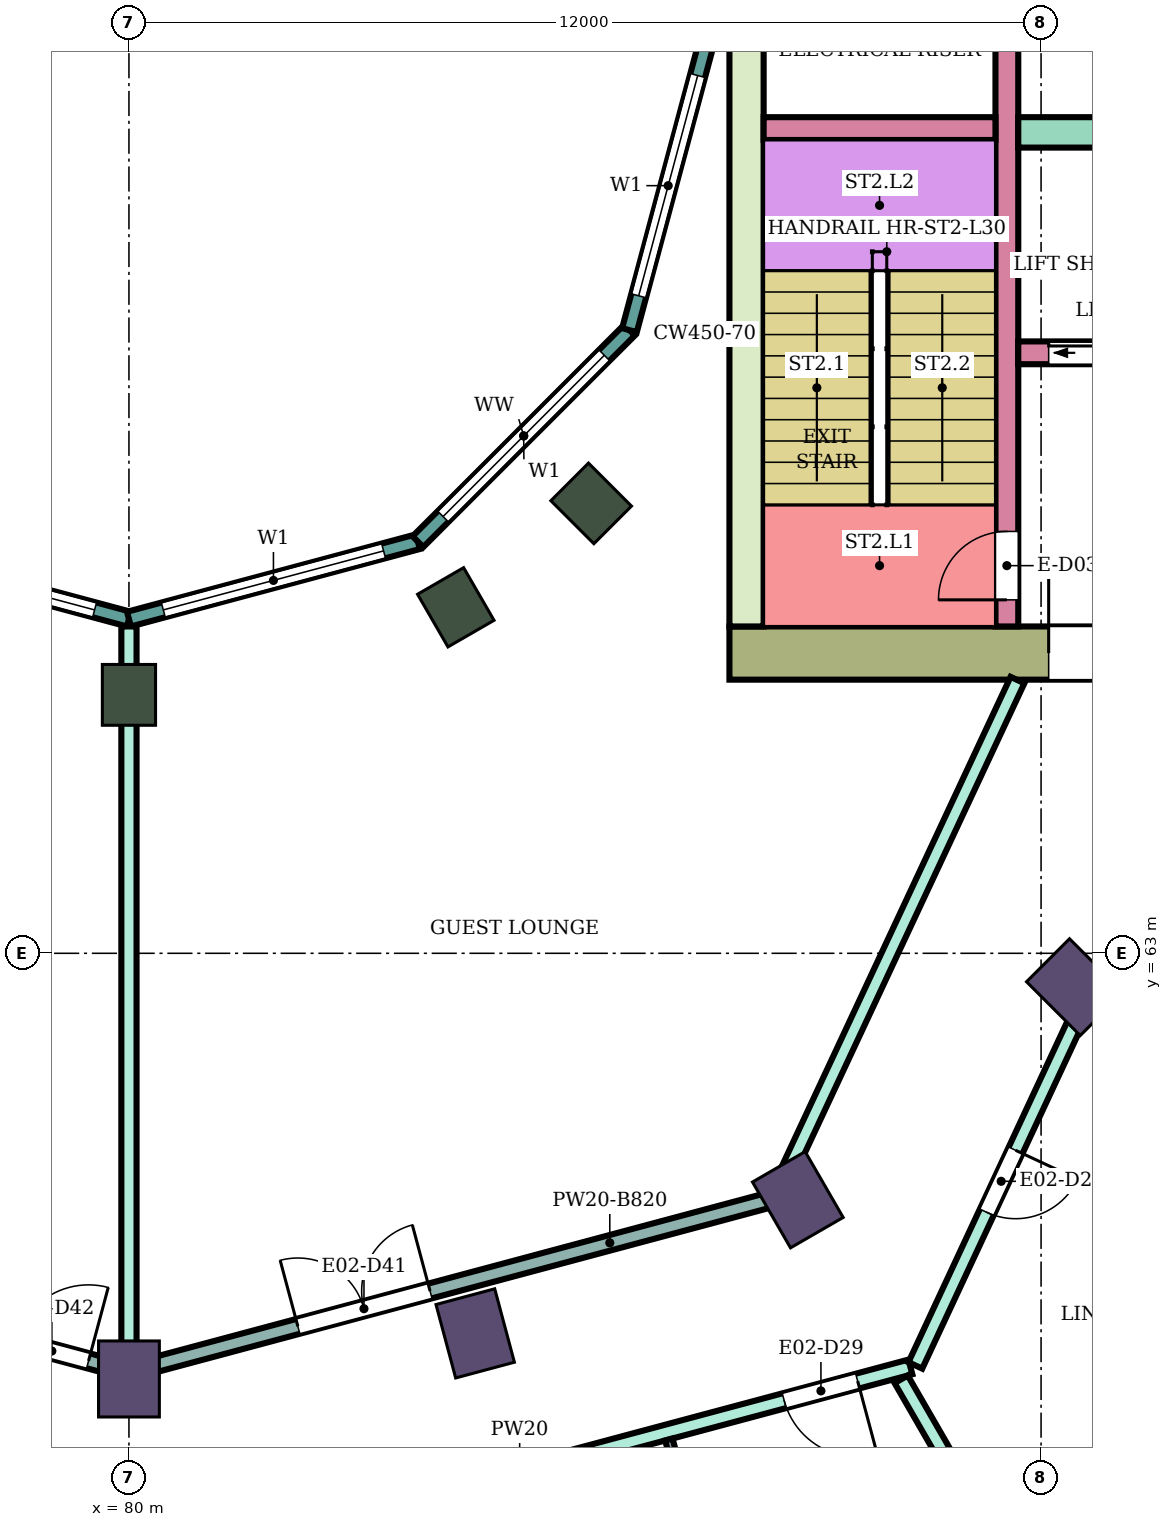
"""IFC4 building model, lengths in metres.
Left out: names, types, materials, properties, quantities, classifications, styles, units other than length and angle.
Written with IfcOpenShell. Run it as: python <this file> out.ifc"""

import sys

from ifc_helpers import new_model, si_unit, direction, frame, frame_2d, origin, origin_2d, place, context, subcontext, project, spatial, rectangle, extrude, element, fill, save


model = new_model("IFC4")
c1 = context("Model", 3, precision=1e-05, world=origin(), true_north=direction((0.0, 1.0)))
c2 = subcontext(c1, "Body", "Model", "MODEL_VIEW")
j1 = project(units=[si_unit("LENGTHUNIT", "METRE"), si_unit("PLANEANGLEUNIT", "RADIAN")], contexts=[c1])
p1 = place(None, origin())
s1 = spatial("IfcSite", under=j1, at=p1, CompositionType="ELEMENT")
p2 = place(p1, origin())
s2 = spatial("IfcBuilding", under=s1, at=p2, CompositionType="ELEMENT")
p3 = place(p2, frame((0.0, 0.0, 130.2)))
s3 = spatial("IfcBuildingStorey", under=s2, at=p3, CompositionType="ELEMENT", Elevation=130.2)
for number, where, z_axis, x_axis in (
    (1, (80.0, 57.4, 0.0), (0.0, 0.0, 1.0), (0.0, -1.0, 0.0)),
    (2, (84.555, 58.0, 0.0), (0.0, 0.0, 1.0), (0.259, -0.966, 0.0)),
    (3, (88.8, 59.758, 0.0), (0.0, 0.0, 1.0), (0.5, -0.866, 0.0)),
    (4, (92.445, 62.555, 0.0), (0.0, 0.0, 1.0), (0.707, -0.707, 0.0)),
):
    element("IfcColumn", number, at=place(p3, frame(where, z_axis=z_axis, x_axis=x_axis)), inside=s3, PredefinedType="COLUMN", context=c2, shape_type="SweptSolid", body=[
        extrude(rectangle(XDim=1.0, YDim=0.8, at=origin_2d()), origin(), (0.0, 0.0, 1.0), 3.9),
    ])
for number, where, z_axis, x_axis in (
    (5, (80.0, 66.4, 0.0), (0.0, 0.0, 1.0), (0.0, -1.0, 0.0)),
    (6, (84.3, 67.552, 0.0), (0.0, 0.0, 1.0), (0.5, -0.866, 0.0)),
    (7, (86.081, 68.919, 0.0), (0.0, 0.0, 1.0), (0.707, -0.707, 0.0)),
):
    element("IfcColumn", number, at=place(p3, frame(where, z_axis=z_axis, x_axis=x_axis)), inside=s3, PredefinedType="COLUMN", context=c2, shape_type="SweptSolid", body=[
        extrude(rectangle(XDim=0.8, YDim=0.7, at=origin_2d()), origin(), (0.0, 0.0, 1.0), 3.9),
    ])
p4 = place(p3, frame((87.9, 66.95, 0.0), z_axis=(0.0, 0.0, 1.0), x_axis=(1.0, 0.0, 0.0)))
e8 = element("IfcWall", 8, at=p4, inside=s3, PredefinedType="SHEAR", context=c2, shape_type="SweptSolid", body=[
    extrude(rectangle(XDim=14.8, YDim=0.7, at=frame_2d((7.4, 0.0))), origin(), (0.0, 0.0, 1.0), 3.58),
])
p5 = place(p4, frame((4.2, 0.0, 0.0)))
e9 = element("IfcOpeningElement", 9, at=p5, cuts=e8, PredefinedType="OPENING", context=c2, shape_type="SweptSolid", body=[
    extrude(rectangle(XDim=2.4, YDim=2.4, at=frame_2d((1.2, 1.2))), frame((0.0, 0.36, 0.0), z_axis=(0.0, -1.0, 0.0), x_axis=(1.0, 0.0, 0.0)), (0.0, 0.0, 1.0), 0.72),
])
p6 = place(p3, frame((88.125, 67.3, 0.0), z_axis=(0.0, 0.0, 1.0), x_axis=(0.0, 1.0, 0.0)))
e10 = element("IfcWall", 10, at=p6, inside=s3, PredefinedType="SHEAR", context=c2, shape_type="SweptSolid", body=[
    extrude(rectangle(XDim=7.7, YDim=0.45, at=frame_2d((3.85, 0.0))), origin(), (0.0, 0.0, 1.0), 3.58),
])
p7 = place(p3, frame((91.55, 67.3, 0.0), z_axis=(0.0, 0.0, 1.0), x_axis=(0.0, 1.0, 0.0)))
e11 = element("IfcWall", 11, at=p7, inside=s3, PredefinedType="SHEAR", context=c2, shape_type="SweptSolid", body=[
    extrude(rectangle(XDim=7.7, YDim=0.3, at=frame_2d((3.85, 0.0))), origin(), (0.0, 0.0, 1.0), 3.58),
])
p8 = place(p7, frame((0.35, 0.0, 0.0)))
e12 = element("IfcOpeningElement", 12, at=p8, cuts=e11, PredefinedType="OPENING", context=c2, shape_type="SweptSolid", body=[
    extrude(rectangle(XDim=0.9, YDim=2.1, at=frame_2d((0.45, 1.05))), frame((0.0, 0.16, 0.0), z_axis=(0.0, -1.0, 0.0), x_axis=(1.0, 0.0, 0.0)), (0.0, 0.0, 1.0), 0.32),
])
p9 = place(p3, frame((88.35, 73.85, 0.0), z_axis=(0.0, 0.0, 1.0), x_axis=(1.0, 0.0, 0.0)))
e13 = element("IfcWall", 13, at=p9, inside=s3, PredefinedType="SHEAR", context=c2, shape_type="SweptSolid", body=[
    extrude(rectangle(XDim=3.05, YDim=0.3, at=frame_2d((1.525, 0.0))), origin(), (0.0, 0.0, 1.0), 3.58),
])
p10 = place(p3, frame((91.7, 73.8, 0.0), z_axis=(0.0, 0.0, 1.0), x_axis=(1.0, 0.0, 0.0)))
e14 = element("IfcWall", 14, at=p10, inside=s3, PredefinedType="SHEAR", context=c2, shape_type="SweptSolid", body=[
    extrude(rectangle(XDim=11.0, YDim=0.4, at=frame_2d((5.5, 0.0))), origin(), (0.0, 0.0, 1.0), 3.58),
])
p11 = place(p3, frame((91.7, 70.9, 0.0), z_axis=(0.0, 0.0, 1.0), x_axis=(1.0, 0.0, 0.0)))
e15 = element("IfcWall", 15, at=p11, inside=s3, PredefinedType="SHEAR", context=c2, shape_type="SweptSolid", body=[
    extrude(rectangle(XDim=11.0, YDim=0.3, at=frame_2d((5.5, 0.0))), origin(), (0.0, 0.0, 1.0), 3.58),
])
p12 = place(p11, frame((0.4, 0.0, 0.0)))
e16 = element("IfcOpeningElement", 16, at=p12, cuts=e15, PredefinedType="OPENING", context=c2, shape_type="SweptSolid", body=[
    extrude(rectangle(XDim=1.4, YDim=2.1, at=frame_2d((0.7, 1.05))), frame((0.0, 0.16, 0.0), z_axis=(0.0, -1.0, 0.0), x_axis=(1.0, 0.0, 0.0)), (0.0, 0.0, 1.0), 0.32),
])
p13 = place(p11, frame((5.4, 0.0, 0.0)))
e17 = element("IfcOpeningElement", 17, at=p13, cuts=e15, PredefinedType="OPENING", context=c2, shape_type="SweptSolid", body=[
    extrude(rectangle(XDim=1.4, YDim=2.1, at=frame_2d((0.7, 1.05))), frame((0.0, 0.16, 0.0), z_axis=(0.0, -1.0, 0.0), x_axis=(1.0, 0.0, 0.0)), (0.0, 0.0, 1.0), 0.32),
])
p14 = place(p11, frame((8.1, 0.0, 0.0)))
e18 = element("IfcOpeningElement", 18, at=p14, cuts=e15, PredefinedType="OPENING", context=c2, shape_type="SweptSolid", body=[
    extrude(rectangle(XDim=1.0, YDim=2.1, at=frame_2d((0.5, 1.05))), frame((0.0, 0.16, 0.0), z_axis=(0.0, -1.0, 0.0), x_axis=(1.0, 0.0, 0.0)), (0.0, 0.0, 1.0), 0.32),
])
p15 = place(p3, frame((76.198, 68.415, 0.0), z_axis=(0.0, 0.0, 1.0), x_axis=(0.965933654434, -0.258789828301, 0.0)))
e19 = element("IfcWall", 19, at=p15, inside=s3, PredefinedType="NOTDEFINED", context=c2, shape_type="SweptSolid", body=[
    extrude(rectangle(XDim=3.936, YDim=0.2, at=frame_2d((1.968, 0.0))), origin(), (0.0, 0.0, 1.0), 3.9),
])
p16 = place(p15, frame((0.468, 0.0, 0.9)))
e20 = element("IfcOpeningElement", 20, at=p16, cuts=e19, PredefinedType="OPENING", context=c2, shape_type="SweptSolid", body=[
    extrude(rectangle(XDim=3.0, YDim=2.3, at=frame_2d((1.5, 1.15))), frame((0.0, 0.11, 0.0), z_axis=(0.0, -1.0, 0.0), x_axis=(1.0, 0.0, 0.0)), (0.0, 0.0, 1.0), 0.22),
])
p17 = place(p3, frame((80.0, 67.396, 0.0), z_axis=(0.0, 0.0, 1.0), x_axis=(0.965933654434, 0.258789828301, 0.0)))
e21 = element("IfcWall", 21, at=p17, inside=s3, PredefinedType="NOTDEFINED", context=c2, shape_type="SweptSolid", body=[
    extrude(rectangle(XDim=3.936, YDim=0.2, at=frame_2d((1.968, 0.0))), origin(), (0.0, 0.0, 1.0), 3.9),
])
p18 = place(p17, frame((0.468, 0.0, 0.9)))
e22 = element("IfcOpeningElement", 22, at=p18, cuts=e21, PredefinedType="OPENING", context=c2, shape_type="SweptSolid", body=[
    extrude(rectangle(XDim=3.0, YDim=2.3, at=frame_2d((1.5, 1.15))), frame((0.0, 0.11, 0.0), z_axis=(0.0, -1.0, 0.0), x_axis=(1.0, 0.0, 0.0)), (0.0, 0.0, 1.0), 0.22),
])
p19 = place(p3, frame((83.802, 68.415, 0.0), z_axis=(0.0, 0.0, 1.0), x_axis=(0.707106781187, 0.707106781187, 0.0)))
e23 = element("IfcWall", 23, at=p19, inside=s3, PredefinedType="NOTDEFINED", context=c2, shape_type="SweptSolid", body=[
    extrude(rectangle(XDim=3.936, YDim=0.2, at=frame_2d((1.968, 0.0))), origin(), (0.0, 0.0, 1.0), 3.9),
])
p20 = place(p19, frame((0.468, 0.0, 0.9)))
e24 = element("IfcOpeningElement", 24, at=p20, cuts=e23, PredefinedType="OPENING", context=c2, shape_type="SweptSolid", body=[
    extrude(rectangle(XDim=3.0, YDim=2.3, at=frame_2d((1.5, 1.15))), frame((0.0, 0.11, 0.0), z_axis=(0.0, -1.0, 0.0), x_axis=(1.0, 0.0, 0.0)), (0.0, 0.0, 1.0), 0.22),
])
p21 = place(p3, frame((86.585, 71.198, 0.0), z_axis=(0.0, 0.0, 1.0), x_axis=(0.258789828301, 0.965933654434, 0.0)))
e25 = element("IfcWall", 25, at=p21, inside=s3, PredefinedType="NOTDEFINED", context=c2, shape_type="SweptSolid", body=[
    extrude(rectangle(XDim=3.936, YDim=0.2, at=frame_2d((1.968, 0.0))), origin(), (0.0, 0.0, 1.0), 3.9),
])
p22 = place(p21, frame((0.468, 0.0, 0.9)))
e26 = element("IfcOpeningElement", 26, at=p22, cuts=e25, PredefinedType="OPENING", context=c2, shape_type="SweptSolid", body=[
    extrude(rectangle(XDim=3.0, YDim=2.3, at=frame_2d((1.5, 1.15))), frame((0.0, 0.11, 0.0), z_axis=(0.0, -1.0, 0.0), x_axis=(1.0, 0.0, 0.0)), (0.0, 0.0, 1.0), 0.22),
])
p23 = place(p3, frame((69.652, 57.578, 0.0), z_axis=(0.0, 0.0, 1.0), x_axis=(0.965851674805, -0.259095623807, 0.0)))
e27 = element("IfcWall", 27, at=p23, inside=s3, PredefinedType="PARTITIONING", context=c2, shape_type="SweptSolid", body=[
    extrude(rectangle(XDim=10.623, YDim=0.2, at=frame_2d((5.312, 0.0))), origin(), (0.0, 0.0, 1.0), 3.45),
])
p24 = place(p23, frame((9.163, 0.0, 0.0)))
e28 = element("IfcOpeningElement", 28, at=p24, cuts=e27, PredefinedType="OPENING", context=c2, shape_type="SweptSolid", body=[
    extrude(rectangle(XDim=1.0, YDim=2.1, at=frame_2d((0.5, 1.05))), frame((0.0, 0.11, 0.0), z_axis=(0.0, -1.0, 0.0), x_axis=(1.0, 0.0, 0.0)), (0.0, 0.0, 1.0), 0.22),
])
p25 = place(p3, frame((71.498, 59.774, 0.0), z_axis=(0.0, 0.0, 1.0), x_axis=(0.965912232838, -0.258869771225, 0.0)))
e29 = element("IfcWall", 29, at=p25, inside=s3, PredefinedType="PARTITIONING", context=c2, shape_type="SweptSolid", body=[
    extrude(rectangle(XDim=8.672, YDim=0.2, at=frame_2d((4.336, 0.0))), origin(), (0.0, 0.0, 1.0), 3.08),
])
p26 = place(p25, frame((7.252, 0.0, 0.0)))
e30 = element("IfcOpeningElement", 30, at=p26, cuts=e29, PredefinedType="OPENING", context=c2, shape_type="SweptSolid", body=[
    extrude(rectangle(XDim=1.0, YDim=2.1, at=frame_2d((0.5, 1.05))), frame((0.0, 0.11, 0.0), z_axis=(0.0, -1.0, 0.0), x_axis=(1.0, 0.0, 0.0)), (0.0, 0.0, 1.0), 0.22),
])
p27 = place(p3, frame((80.0, 54.805, 0.0), z_axis=(0.0, 0.0, 1.0), x_axis=(0.965967909695, 0.258661936588, 0.0)))
e31 = element("IfcWall", 31, at=p27, inside=s3, PredefinedType="PARTITIONING", context=c2, shape_type="SweptSolid", body=[
    extrude(rectangle(XDim=10.643, YDim=0.2, at=frame_2d((5.322, 0.0))), origin(), (0.0, 0.0, 1.0), 3.45),
])
p28 = place(p27, frame((8.925, 0.0, 0.0)))
e32 = element("IfcOpeningElement", 32, at=p28, cuts=e31, PredefinedType="OPENING", context=c2, shape_type="SweptSolid", body=[
    extrude(rectangle(XDim=1.0, YDim=2.1, at=frame_2d((0.5, 1.05))), frame((0.0, 0.11, 0.0), z_axis=(0.0, -1.0, 0.0), x_axis=(1.0, 0.0, 0.0)), (0.0, 0.0, 1.0), 0.22),
])
p29 = place(p27, frame((2.123, 0.0, 0.0)))
e33 = element("IfcOpeningElement", 33, at=p29, cuts=e31, PredefinedType="OPENING", context=c2, shape_type="SweptSolid", body=[
    extrude(rectangle(XDim=1.0, YDim=2.1, at=frame_2d((0.5, 1.05))), frame((0.0, 0.11, 0.0), z_axis=(0.0, -1.0, 0.0), x_axis=(1.0, 0.0, 0.0)), (0.0, 0.0, 1.0), 0.22),
])
p30 = place(p3, frame((80.0, 57.627, 0.0), z_axis=(0.0, 0.0, 1.0), x_axis=(0.0, 1.0, 0.0)))
e34 = element("IfcWall", 34, at=p30, inside=s3, PredefinedType="PARTITIONING", context=c2, shape_type="SweptSolid", body=[
    extrude(rectangle(XDim=9.673, YDim=0.2, at=frame_2d((4.836, 0.0))), origin(), (0.0, 0.0, 1.0), 3.45),
])
p31 = place(p3, frame((80.001, 57.496, 0.0), z_axis=(0.0, 0.0, 1.0), x_axis=(0.965924211089, 0.258825073035, 0.0)))
e35 = element("IfcWall", 35, at=p31, inside=s3, PredefinedType="PARTITIONING", context=c2, shape_type="SweptSolid", body=[
    extrude(rectangle(XDim=8.731, YDim=0.2, at=frame_2d((4.365, 0.0))), origin(), (0.0, 0.0, 1.0), 3.08),
])
p32 = place(p31, frame((2.3, 0.0, 0.0)))
e36 = element("IfcOpeningElement", 36, at=p32, cuts=e35, PredefinedType="OPENING", context=c2, shape_type="SweptSolid", body=[
    extrude(rectangle(XDim=1.8, YDim=2.1, at=frame_2d((0.9, 1.05))), frame((0.0, 0.11, 0.0), z_axis=(0.0, -1.0, 0.0), x_axis=(1.0, 0.0, 0.0)), (0.0, 0.0, 1.0), 0.22),
])
p33 = place(p3, frame((88.502, 59.774, 0.0), z_axis=(0.0, 0.0, 1.0), x_axis=(0.423423307095, 0.905931952747, 0.0)))
e37 = element("IfcWall", 37, at=p33, inside=s3, PredefinedType="PARTITIONING", context=c2, shape_type="SweptSolid", body=[
    extrude(rectangle(XDim=7.529, YDim=0.2, at=frame_2d((3.764, 0.0))), origin(), (0.0, 0.0, 1.0), 3.45),
])
p34 = place(p3, frame((90.16, 57.396, 0.0), z_axis=(0.0, 0.0, 1.0), x_axis=(0.499848624781, -0.86611278267, 0.0)))
e38 = element("IfcWall", 38, at=p34, inside=s3, PredefinedType="PARTITIONING", context=c2, shape_type="SweptSolid", body=[
    extrude(rectangle(XDim=5.472, YDim=0.2, at=frame_2d((2.736, 0.0))), origin(), (0.0, 0.0, 1.0), 3.45),
])
p35 = place(p3, frame((90.346, 57.578, 0.0), z_axis=(0.0, 0.0, 1.0), x_axis=(0.422476720533, 0.906373775331, 0.0)))
e39 = element("IfcWall", 39, at=p35, inside=s3, PredefinedType="PARTITIONING", context=c2, shape_type="SweptSolid", body=[
    extrude(rectangle(XDim=8.208, YDim=0.2, at=frame_2d((4.104, 0.0))), origin(), (0.0, 0.0, 1.0), 3.45),
])
p36 = place(p35, frame((2.223, 0.0, 0.0)))
e40 = element("IfcOpeningElement", 40, at=p36, cuts=e39, PredefinedType="OPENING", context=c2, shape_type="SweptSolid", body=[
    extrude(rectangle(XDim=0.9, YDim=2.1, at=frame_2d((0.45, 1.05))), frame((0.0, 0.11, 0.0), z_axis=(0.0, -1.0, 0.0), x_axis=(1.0, 0.0, 0.0)), (0.0, 0.0, 1.0), 0.22),
])
p37 = place(p3, frame((92.692, 62.303, 0.0), z_axis=(0.0, 0.0, 1.0), x_axis=(0.706943936447, -0.707269588432, 0.0)))
e41 = element("IfcWall", 41, at=p37, inside=s3, PredefinedType="PARTITIONING", context=c2, shape_type="SweptSolid", body=[
    extrude(rectangle(XDim=5.248, YDim=0.2, at=frame_2d((2.624, 0.0))), origin(), (0.0, 0.0, 1.0), 3.45),
])
p38 = place(p3, frame((87.103, 56.604, 0.0), z_axis=(0.0, 0.0, 1.0), x_axis=(0.258883730688, -0.965908491517, 0.0)))
e42 = element("IfcWall", 42, at=p38, inside=s3, PredefinedType="PARTITIONING", context=c2, shape_type="SweptSolid", body=[
    extrude(rectangle(XDim=2.7, YDim=0.1, at=frame_2d((1.35, 0.0))), origin(), (0.0, 0.0, 1.0), 3.45),
])
p39 = place(p38, frame((0.9, 0.0, 0.0)))
e43 = element("IfcOpeningElement", 43, at=p39, cuts=e42, PredefinedType="OPENING", context=c2, shape_type="SweptSolid", body=[
    extrude(rectangle(XDim=0.8, YDim=2.1, at=frame_2d((0.4, 1.05))), frame((0.0, 0.06, 0.0), z_axis=(0.0, -1.0, 0.0), x_axis=(1.0, 0.0, 0.0)), (0.0, 0.0, 1.0), 0.12),
])
p40 = place(p3, frame((92.477, 53.619, 0.0), z_axis=(0.0, 0.0, 1.0), x_axis=(0.421913254756, 0.90663620348, 0.0)))
e44 = element("IfcWall", 44, at=p40, inside=s3, PredefinedType="PARTITIONING", context=c2, shape_type="SweptSolid", body=[
    extrude(rectangle(XDim=6.573, YDim=0.1, at=frame_2d((3.287, 0.0))), origin(), (0.0, 0.0, 1.0), 2.68),
])
p41 = place(p40, frame((2.831, 0.0, 0.0)))
e45 = element("IfcOpeningElement", 45, at=p41, cuts=e44, PredefinedType="OPENING", context=c2, shape_type="SweptSolid", body=[
    extrude(rectangle(XDim=0.9, YDim=2.1, at=frame_2d((0.45, 1.05))), frame((0.0, 0.06, 0.0), z_axis=(0.0, -1.0, 0.0), x_axis=(1.0, 0.0, 0.0)), (0.0, 0.0, 1.0), 0.12),
])
p42 = place(p16, origin())
e46 = element("IfcWindow", 46, at=p42, inside=s3, PartitioningType="SINGLE_PANEL", PredefinedType="WINDOW", context=c2, shape_type="SweptSolid", body=[
    extrude(rectangle(XDim=3.0, YDim=2.3, at=frame_2d((1.5, 1.15))), frame((0.0, 0.03, 0.0), z_axis=(0.0, -1.0, 0.0), x_axis=(1.0, 0.0, 0.0)), (0.0, 0.0, 1.0), 0.06),
])
fill(e20, e46)
p43 = place(p18, origin())
e47 = element("IfcWindow", 47, at=p43, inside=s3, PartitioningType="SINGLE_PANEL", PredefinedType="WINDOW", context=c2, shape_type="SweptSolid", body=[
    extrude(rectangle(XDim=3.0, YDim=2.3, at=frame_2d((1.5, 1.15))), frame((0.0, 0.03, 0.0), z_axis=(0.0, -1.0, 0.0), x_axis=(1.0, 0.0, 0.0)), (0.0, 0.0, 1.0), 0.06),
])
fill(e22, e47)
p44 = place(p20, origin())
e48 = element("IfcWindow", 48, at=p44, inside=s3, PartitioningType="SINGLE_PANEL", PredefinedType="WINDOW", context=c2, shape_type="SweptSolid", body=[
    extrude(rectangle(XDim=3.0, YDim=2.3, at=frame_2d((1.5, 1.15))), frame((0.0, 0.03, 0.0), z_axis=(0.0, -1.0, 0.0), x_axis=(1.0, 0.0, 0.0)), (0.0, 0.0, 1.0), 0.06),
])
fill(e24, e48)
p45 = place(p22, origin())
e49 = element("IfcWindow", 49, at=p45, inside=s3, PartitioningType="SINGLE_PANEL", PredefinedType="WINDOW", context=c2, shape_type="SweptSolid", body=[
    extrude(rectangle(XDim=3.0, YDim=2.3, at=frame_2d((1.5, 1.15))), frame((0.0, 0.03, 0.0), z_axis=(0.0, -1.0, 0.0), x_axis=(1.0, 0.0, 0.0)), (0.0, 0.0, 1.0), 0.06),
])
fill(e26, e49)
p46 = place(p36, frame((0.9, 0.0, 0.0), z_axis=(0.0, 0.0, 1.0), x_axis=(-1.0, 0.0, 0.0)))
e50 = element("IfcDoor", 50, at=p46, inside=s3, OperationType="SINGLE_SWING_LEFT", PredefinedType="DOOR", context=c2, shape_type="SweptSolid", body=[
    extrude(rectangle(XDim=0.9, YDim=2.1, at=frame_2d((0.45, 1.05))), frame((0.0, 0.025, 0.0), z_axis=(0.0, -1.0, 0.0), x_axis=(1.0, 0.0, 0.0)), (0.0, 0.0, 1.0), 0.05),
])
fill(e40, e50)
p47 = place(p28, frame((1.0, 0.0, 0.0), z_axis=(0.0, 0.0, 1.0), x_axis=(-1.0, 0.0, 0.0)))
e51 = element("IfcDoor", 51, at=p47, inside=s3, OperationType="SINGLE_SWING_LEFT", PredefinedType="DOOR", context=c2, shape_type="SweptSolid", body=[
    extrude(rectangle(XDim=1.0, YDim=2.1, at=frame_2d((0.5, 1.05))), frame((0.0, 0.025, 0.0), z_axis=(0.0, -1.0, 0.0), x_axis=(1.0, 0.0, 0.0)), (0.0, 0.0, 1.0), 0.05),
])
fill(e32, e51)
p48 = place(p32, origin())
e52 = element("IfcDoor", 52, at=p48, inside=s3, OperationType="DOUBLE_DOOR_SINGLE_SWING", PredefinedType="DOOR", context=c2, shape_type="SweptSolid", body=[
    extrude(rectangle(XDim=1.8, YDim=2.1, at=frame_2d((0.9, 1.05))), frame((0.0, 0.025, 0.0), z_axis=(0.0, -1.0, 0.0), x_axis=(1.0, 0.0, 0.0)), (0.0, 0.0, 1.0), 0.05),
])
fill(e36, e52)
p49 = place(p26, origin())
e53 = element("IfcDoor", 53, at=p49, inside=s3, OperationType="SINGLE_SWING_RIGHT", PredefinedType="DOOR", context=c2, shape_type="SweptSolid", body=[
    extrude(rectangle(XDim=1.0, YDim=2.1, at=frame_2d((0.5, 1.05))), frame((0.0, 0.025, 0.0), z_axis=(0.0, -1.0, 0.0), x_axis=(1.0, 0.0, 0.0)), (0.0, 0.0, 1.0), 0.05),
])
fill(e30, e53)
p50 = place(p8, origin())
e54 = element("IfcDoor", 54, at=p50, inside=s3, OperationType="SINGLE_SWING_LEFT", PredefinedType="DOOR", context=c2, shape_type="SweptSolid", body=[
    extrude(rectangle(XDim=0.9, YDim=2.1, at=frame_2d((0.45, 1.05))), frame((0.0, 0.025, 0.0), z_axis=(0.0, -1.0, 0.0), x_axis=(1.0, 0.0, 0.0)), (0.0, 0.0, 1.0), 0.05),
])
fill(e12, e54)
p51 = place(p12, origin())
e55 = element("IfcDoor", 55, at=p51, inside=s3, OperationType="DOUBLE_DOOR_SLIDING", PredefinedType="DOOR", context=c2, shape_type="SweptSolid", body=[
    extrude(rectangle(XDim=1.4, YDim=2.1, at=frame_2d((0.7, 1.05))), frame((0.0, 0.025, 0.0), z_axis=(0.0, -1.0, 0.0), x_axis=(1.0, 0.0, 0.0)), (0.0, 0.0, 1.0), 0.05),
])
fill(e16, e55)
p52 = place(p5, origin())
e56 = element("IfcDoor", 56, at=p52, inside=s3, OperationType="DOUBLE_DOOR_SINGLE_SWING", PredefinedType="DOOR", context=c2, shape_type="SweptSolid", body=[
    extrude(rectangle(XDim=2.4, YDim=2.4, at=frame_2d((1.2, 1.2))), frame((0.0, 0.025, 0.0), z_axis=(0.0, -1.0, 0.0), x_axis=(1.0, 0.0, 0.0)), (0.0, 0.0, 1.0), 0.05),
])
fill(e9, e56)
save(model, sys.argv[1])
